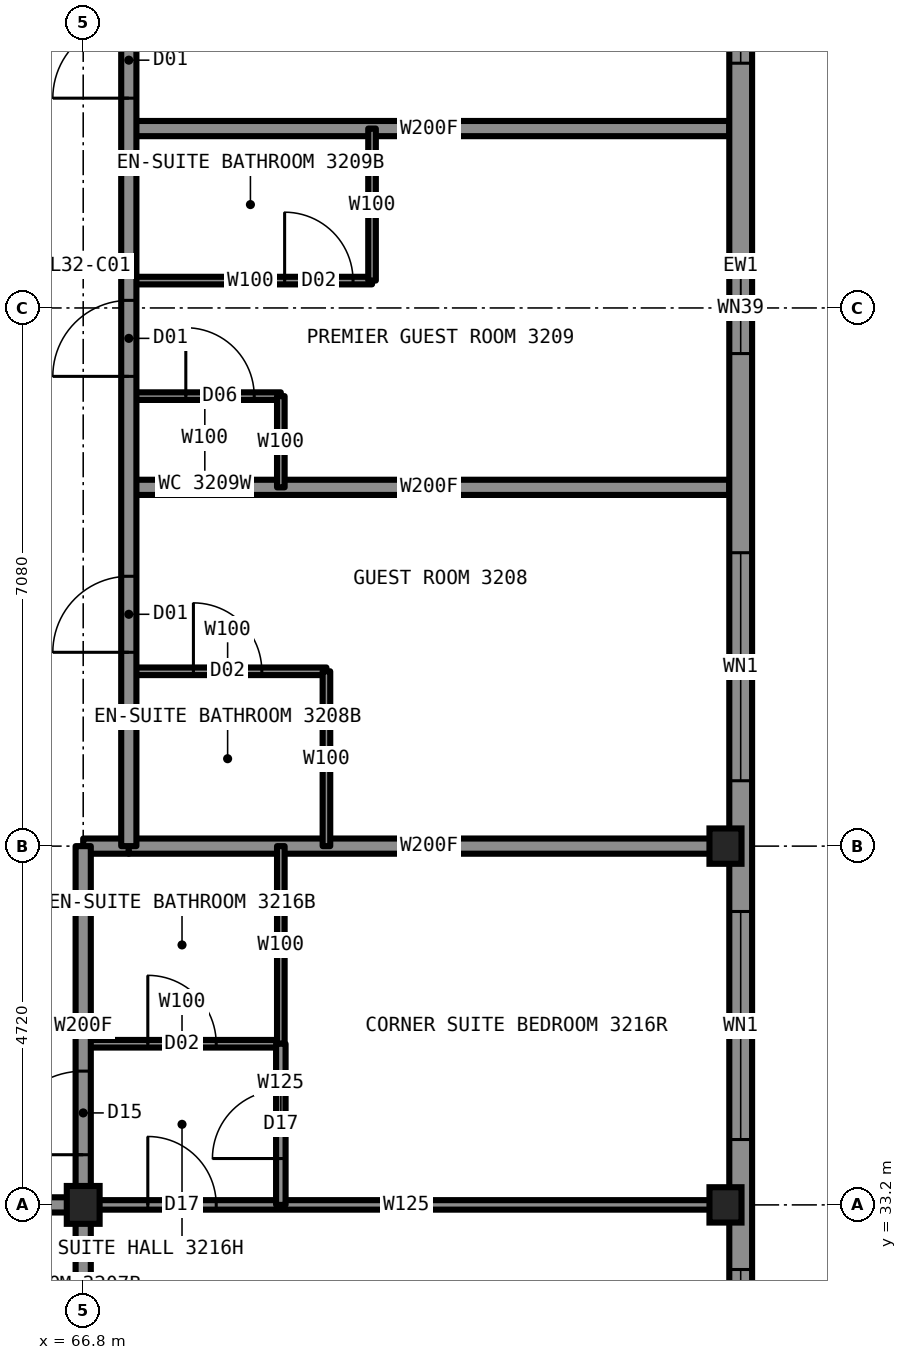
"""IFC4 building model, lengths in metres.
Left out: names, types, materials, properties, quantities, classifications, styles, units other than length and angle.
Written with IfcOpenShell. Run it as: python <this file> out.ifc"""

import sys

from ifc_helpers import new_model, si_unit, direction, frame, frame_2d, origin, origin_2d, place, context, subcontext, project, spatial, rectangle, i_section, extrude, element, fill, save


model = new_model("IFC4")
c1 = context("Model", 3, precision=1e-05, world=origin(), true_north=direction((0.0, 1.0)))
c2 = subcontext(c1, "Body", "Model", "MODEL_VIEW")
j1 = project(units=[si_unit("LENGTHUNIT", "METRE"), si_unit("PLANEANGLEUNIT", "RADIAN")], contexts=[c1])
p1 = place(None, origin())
s1 = spatial("IfcSite", under=j1, at=p1, CompositionType="ELEMENT")
p2 = place(p1, origin())
s2 = spatial("IfcBuilding", under=s1, at=p2, CompositionType="ELEMENT")
p3 = place(p2, frame((0.0, 0.0, 114.4)))
s3 = spatial("IfcBuildingStorey", under=s2, at=p3, CompositionType="ELEMENT", Elevation=114.4)
for number, where, z_axis, x_axis in (
    (1, (75.25, 33.2, 0.0), (0.0, 0.0, 1.0), (1.0, 0.0, 0.0)),
    (2, (75.25, 37.92, 0.0), (0.0, 0.0, 1.0), (1.0, 0.0, 0.0)),
):
    element("IfcColumn", number, at=place(p3, frame(where, z_axis=z_axis, x_axis=x_axis)), inside=s3, PredefinedType="COLUMN", context=c2, shape_type="SweptSolid", body=[
        extrude(i_section(OverallWidth=0.422, OverallDepth=0.465, WebThickness=0.045, FlangeThickness=0.073, at=origin_2d()), origin(), (0.0, 0.0, 1.0), 3.5),
    ])
p4 = place(p3, frame((66.8, 33.2, 0.0), z_axis=(0.0, 0.0, 1.0), x_axis=(1.0, 0.0, 0.0)))
e3 = element("IfcColumn", 3, at=p4, inside=s3, PredefinedType="COLUMN", context=c2, shape_type="SweptSolid", body=[
    extrude(i_section(OverallWidth=0.432, OverallDepth=0.498, WebThickness=0.056, FlangeThickness=0.089, at=origin_2d()), origin(), (0.0, 0.0, 1.0), 3.5),
])
p5 = place(p3, frame((67.4, 43.84, 0.0), z_axis=(0.0, 0.0, 1.0), x_axis=(1.0, 0.0, 0.0)))
e4 = element("IfcWall", 4, at=p5, inside=s3, PredefinedType="PARTITIONING", context=c2, shape_type="SweptSolid", body=[
    extrude(rectangle(XDim=2.0, YDim=0.1, at=frame_2d((1.0, 0.0))), origin(), (0.0, 0.0, 1.0), 3.33),
])
p6 = place(p5, frame((0.75, 0.0, 0.0)))
e5 = element("IfcOpeningElement", 5, at=p6, cuts=e4, PredefinedType="OPENING", context=c2, shape_type="SweptSolid", body=[
    extrude(rectangle(XDim=0.9, YDim=2.1, at=frame_2d((0.45, 1.05))), frame((0.0, 0.06, 0.0), z_axis=(0.0, -1.0, 0.0), x_axis=(1.0, 0.0, 0.0)), (0.0, 0.0, 1.0), 0.12),
])
p7 = place(p3, frame((43.2, 33.2, 0.0), z_axis=(0.0, 0.0, 1.0), x_axis=(1.0, 0.0, 0.0)))
e6 = element("IfcWall", 6, at=p7, inside=s3, PredefinedType="PARTITIONING", context=c2, shape_type="SweptSolid", body=[
    extrude(rectangle(XDim=23.6, YDim=0.2, at=frame_2d((11.8, 0.0))), origin(), (0.0, 0.0, 1.0), 3.33),
])
p8 = place(p7, frame((0.7, 0.0, 0.0)))
e7 = element("IfcOpeningElement", 7, at=p8, cuts=e6, PredefinedType="OPENING", context=c2, shape_type="SweptSolid", body=[
    extrude(rectangle(XDim=1.0, YDim=2.2, at=frame_2d((0.5, 1.1))), frame((0.0, 0.11, 0.0), z_axis=(0.0, -1.0, 0.0), x_axis=(1.0, 0.0, 0.0)), (0.0, 0.0, 1.0), 0.22),
])
p9 = place(p7, frame((6.57, 0.0, 0.0)))
e8 = element("IfcOpeningElement", 8, at=p9, cuts=e6, PredefinedType="OPENING", context=c2, shape_type="SweptSolid", body=[
    extrude(rectangle(XDim=1.1, YDim=2.2, at=frame_2d((0.55, 1.1))), frame((0.0, 0.11, 0.0), z_axis=(0.0, -1.0, 0.0), x_axis=(1.0, 0.0, 0.0)), (0.0, 0.0, 1.0), 0.22),
])
p10 = place(p7, frame((20.34, 0.0, 0.0)))
e9 = element("IfcOpeningElement", 9, at=p10, cuts=e6, PredefinedType="OPENING", context=c2, shape_type="SweptSolid", body=[
    extrude(rectangle(XDim=1.0, YDim=2.2, at=frame_2d((0.5, 1.1))), frame((0.0, 0.11, 0.0), z_axis=(0.0, -1.0, 0.0), x_axis=(1.0, 0.0, 0.0)), (0.0, 0.0, 1.0), 0.22),
])
p11 = place(p3, frame((66.8, 33.2, 0.0), z_axis=(0.0, 0.0, 1.0), x_axis=(1.0, 0.0, 0.0)))
e10 = element("IfcWall", 10, at=p11, inside=s3, PredefinedType="PARTITIONING", context=c2, shape_type="SweptSolid", body=[
    extrude(rectangle(XDim=8.5, YDim=0.125, at=frame_2d((4.25, 0.0))), origin(), (0.0, 0.0, 1.0), 2.573),
])
p12 = place(p11, frame((0.85, 0.0, 0.0)))
e11 = element("IfcOpeningElement", 11, at=p12, cuts=e10, PredefinedType="OPENING", context=c2, shape_type="SweptSolid", body=[
    extrude(rectangle(XDim=0.9, YDim=2.2, at=frame_2d((0.45, 1.1))), frame((0.0, 0.073, 0.0), z_axis=(0.0, -1.0, 0.0), x_axis=(1.0, 0.0, 0.0)), (0.0, 0.0, 1.0), 0.145),
])
p13 = place(p3, frame((67.4, 42.64, 0.0), z_axis=(0.0, 0.0, 1.0), x_axis=(1.0, 0.0, 0.0)))
e12 = element("IfcWall", 12, at=p13, inside=s3, PredefinedType="PARTITIONING", context=c2, shape_type="SweptSolid", body=[
    extrude(rectangle(XDim=7.9, YDim=0.2, at=frame_2d((3.95, 0.0))), origin(), (0.0, 0.0, 1.0), 2.731),
])
p14 = place(p3, frame((67.4, 40.22, 0.0), z_axis=(0.0, 0.0, 1.0), x_axis=(1.0, 0.0, 0.0)))
e13 = element("IfcWall", 13, at=p14, inside=s3, PredefinedType="PARTITIONING", context=c2, shape_type="SweptSolid", body=[
    extrude(rectangle(XDim=2.6, YDim=0.1, at=frame_2d((1.3, 0.0))), origin(), (0.0, 0.0, 1.0), 2.731),
])
p15 = place(p14, frame((0.85, 0.0, 0.0)))
e14 = element("IfcOpeningElement", 14, at=p15, cuts=e13, PredefinedType="OPENING", context=c2, shape_type="SweptSolid", body=[
    extrude(rectangle(XDim=0.9, YDim=2.1, at=frame_2d((0.45, 1.05))), frame((0.0, 0.06, 0.0), z_axis=(0.0, -1.0, 0.0), x_axis=(1.0, 0.0, 0.0)), (0.0, 0.0, 1.0), 0.12),
])
p16 = place(p3, frame((66.8, 37.92, 0.0), z_axis=(0.0, 0.0, 1.0), x_axis=(1.0, 0.0, 0.0)))
e15 = element("IfcWall", 15, at=p16, inside=s3, PredefinedType="PARTITIONING", context=c2, shape_type="SweptSolid", body=[
    extrude(rectangle(XDim=0.6, YDim=0.2, at=frame_2d((0.3, 0.0))), origin(), (0.0, 0.0, 1.0), 2.573),
])
p17 = place(p3, frame((67.4, 37.92, 0.0), z_axis=(0.0, 0.0, 1.0), x_axis=(1.0, 0.0, 0.0)))
e16 = element("IfcWall", 16, at=p17, inside=s3, PredefinedType="PARTITIONING", context=c2, shape_type="SweptSolid", body=[
    extrude(rectangle(XDim=7.9, YDim=0.2, at=frame_2d((3.95, 0.0))), origin(), (0.0, 0.0, 1.0), 2.573),
])
p18 = place(p3, frame((66.8, 35.32, 0.0), z_axis=(0.0, 0.0, 1.0), x_axis=(1.0, 0.0, 0.0)))
e17 = element("IfcWall", 17, at=p18, inside=s3, PredefinedType="PARTITIONING", context=c2, shape_type="SweptSolid", body=[
    extrude(rectangle(XDim=2.6, YDim=0.1, at=frame_2d((1.3, 0.0))), origin(), (0.0, 0.0, 1.0), 3.33),
])
p19 = place(p18, frame((0.85, 0.0, 0.0)))
e18 = element("IfcOpeningElement", 18, at=p19, cuts=e17, PredefinedType="OPENING", context=c2, shape_type="SweptSolid", body=[
    extrude(rectangle(XDim=0.9, YDim=2.1, at=frame_2d((0.45, 1.05))), frame((0.0, 0.06, 0.0), z_axis=(0.0, -1.0, 0.0), x_axis=(1.0, 0.0, 0.0)), (0.0, 0.0, 1.0), 0.12),
])
p20 = place(p3, frame((67.4, 45.36, 0.0), z_axis=(0.0, 0.0, 1.0), x_axis=(1.0, 0.0, 0.0)))
e19 = element("IfcWall", 19, at=p20, inside=s3, PredefinedType="PARTITIONING", context=c2, shape_type="SweptSolid", body=[
    extrude(rectangle(XDim=3.2, YDim=0.1, at=frame_2d((1.6, 0.0))), origin(), (0.0, 0.0, 1.0), 3.33),
])
p21 = place(p20, frame((2.05, 0.0, 0.0)))
e20 = element("IfcOpeningElement", 20, at=p21, cuts=e19, PredefinedType="OPENING", context=c2, shape_type="SweptSolid", body=[
    extrude(rectangle(XDim=0.9, YDim=2.1, at=frame_2d((0.45, 1.05))), frame((0.0, 0.06, 0.0), z_axis=(0.0, -1.0, 0.0), x_axis=(1.0, 0.0, 0.0)), (0.0, 0.0, 1.0), 0.12),
])
p22 = place(p3, frame((67.4, 47.36, 0.0), z_axis=(0.0, 0.0, 1.0), x_axis=(1.0, 0.0, 0.0)))
e21 = element("IfcWall", 21, at=p22, inside=s3, PredefinedType="PARTITIONING", context=c2, shape_type="SweptSolid", body=[
    extrude(rectangle(XDim=7.9, YDim=0.2, at=frame_2d((3.95, 0.0))), origin(), (0.0, 0.0, 1.0), 2.731),
])
p23 = place(p3, frame((66.8, 33.2, 0.0), z_axis=(0.0, 0.0, 1.0), x_axis=(0.0, 1.0, 0.0)))
e22 = element("IfcWall", 22, at=p23, inside=s3, PredefinedType="PARTITIONING", context=c2, shape_type="SweptSolid", body=[
    extrude(rectangle(XDim=4.72, YDim=0.2, at=frame_2d((2.36, 0.0))), origin(), (0.0, 0.0, 1.0), 3.33),
])
p24 = place(p23, frame((0.66, 0.0, 0.0)))
e23 = element("IfcOpeningElement", 23, at=p24, cuts=e22, PredefinedType="OPENING", context=c2, shape_type="SweptSolid", body=[
    extrude(rectangle(XDim=1.1, YDim=2.2, at=frame_2d((0.55, 1.1))), frame((0.0, 0.11, 0.0), z_axis=(0.0, -1.0, 0.0), x_axis=(1.0, 0.0, 0.0)), (0.0, 0.0, 1.0), 0.22),
])
p25 = place(p3, frame((66.8, 24.7, 0.0), z_axis=(0.0, 0.0, 1.0), x_axis=(0.0, 1.0, 0.0)))
e24 = element("IfcWall", 24, at=p25, inside=s3, PredefinedType="PARTITIONING", context=c2, shape_type="SweptSolid", body=[
    extrude(rectangle(XDim=8.5, YDim=0.2, at=frame_2d((4.25, 0.0))), origin(), (0.0, 0.0, 1.0), 2.573),
])
p26 = place(p3, frame((67.4, 37.92, 0.0), z_axis=(0.0, 0.0, 1.0), x_axis=(0.0, 1.0, 0.0)))
e25 = element("IfcWall", 25, at=p26, inside=s3, PredefinedType="PARTITIONING", context=c2, shape_type="SweptSolid", body=[
    extrude(rectangle(XDim=14.16, YDim=0.2, at=frame_2d((7.08, 0.0))), origin(), (0.0, 0.0, 1.0), 3.33),
])
p27 = place(p26, frame((2.55, 0.0, 0.0)))
e26 = element("IfcOpeningElement", 26, at=p27, cuts=e25, PredefinedType="OPENING", context=c2, shape_type="SweptSolid", body=[
    extrude(rectangle(XDim=1.0, YDim=2.2, at=frame_2d((0.5, 1.1))), frame((0.0, 0.11, 0.0), z_axis=(0.0, -1.0, 0.0), x_axis=(1.0, 0.0, 0.0)), (0.0, 0.0, 1.0), 0.22),
])
p28 = place(p26, frame((6.18, 0.0, 0.0)))
e27 = element("IfcOpeningElement", 27, at=p28, cuts=e25, PredefinedType="OPENING", context=c2, shape_type="SweptSolid", body=[
    extrude(rectangle(XDim=1.0, YDim=2.2, at=frame_2d((0.5, 1.1))), frame((0.0, 0.11, 0.0), z_axis=(0.0, -1.0, 0.0), x_axis=(1.0, 0.0, 0.0)), (0.0, 0.0, 1.0), 0.22),
])
p29 = place(p26, frame((9.84, 0.0, 0.0)))
e28 = element("IfcOpeningElement", 28, at=p29, cuts=e25, PredefinedType="OPENING", context=c2, shape_type="SweptSolid", body=[
    extrude(rectangle(XDim=1.0, YDim=2.2, at=frame_2d((0.5, 1.1))), frame((0.0, 0.11, 0.0), z_axis=(0.0, -1.0, 0.0), x_axis=(1.0, 0.0, 0.0)), (0.0, 0.0, 1.0), 0.22),
])
p30 = place(p3, frame((69.4, 35.32, 0.0), z_axis=(0.0, 0.0, 1.0), x_axis=(0.0, 1.0, 0.0)))
e29 = element("IfcWall", 29, at=p30, inside=s3, PredefinedType="PARTITIONING", context=c2, shape_type="SweptSolid", body=[
    extrude(rectangle(XDim=2.6, YDim=0.1, at=frame_2d((1.3, 0.0))), origin(), (0.0, 0.0, 1.0), 3.33),
])
p31 = place(p3, frame((69.4, 42.64, 0.0), z_axis=(0.0, 0.0, 1.0), x_axis=(0.0, 1.0, 0.0)))
e30 = element("IfcWall", 30, at=p31, inside=s3, PredefinedType="PARTITIONING", context=c2, shape_type="SweptSolid", body=[
    extrude(rectangle(XDim=1.2, YDim=0.1, at=frame_2d((0.6, 0.0))), origin(), (0.0, 0.0, 1.0), 3.33),
])
p32 = place(p3, frame((69.4, 33.2, 0.0), z_axis=(0.0, 0.0, 1.0), x_axis=(0.0, 1.0, 0.0)))
e31 = element("IfcWall", 31, at=p32, inside=s3, PredefinedType="PARTITIONING", context=c2, shape_type="SweptSolid", body=[
    extrude(rectangle(XDim=2.12, YDim=0.125, at=frame_2d((1.06, 0.0))), origin(), (0.0, 0.0, 1.0), 3.33),
])
p33 = place(p32, frame((0.61, 0.0, 0.0)))
e32 = element("IfcOpeningElement", 32, at=p33, cuts=e31, PredefinedType="OPENING", context=c2, shape_type="SweptSolid", body=[
    extrude(rectangle(XDim=0.9, YDim=2.2, at=frame_2d((0.45, 1.1))), frame((0.0, 0.073, 0.0), z_axis=(0.0, -1.0, 0.0), x_axis=(1.0, 0.0, 0.0)), (0.0, 0.0, 1.0), 0.145),
])
p34 = place(p3, frame((70.0, 37.92, 0.0), z_axis=(0.0, 0.0, 1.0), x_axis=(0.0, 1.0, 0.0)))
e33 = element("IfcWall", 33, at=p34, inside=s3, PredefinedType="PARTITIONING", context=c2, shape_type="SweptSolid", body=[
    extrude(rectangle(XDim=2.3, YDim=0.1, at=frame_2d((1.15, 0.0))), origin(), (0.0, 0.0, 1.0), 3.33),
])
p35 = place(p3, frame((70.6, 45.36, 0.0), z_axis=(0.0, 0.0, 1.0), x_axis=(0.0, 1.0, 0.0)))
e34 = element("IfcWall", 34, at=p35, inside=s3, PredefinedType="PARTITIONING", context=c2, shape_type="SweptSolid", body=[
    extrude(rectangle(XDim=2.0, YDim=0.1, at=frame_2d((1.0, 0.0))), origin(), (0.0, 0.0, 1.0), 3.33),
])
p36 = place(p3, frame((75.45, 29.9, 0.0), z_axis=(0.0, 0.0, 1.0), x_axis=(0.0, 1.0, 0.0)))
e35 = element("IfcWall", 35, at=p36, inside=s3, PredefinedType="SOLIDWALL", context=c2, shape_type="SweptSolid", body=[
    extrude(rectangle(XDim=30.2, YDim=0.3, at=frame_2d((15.1, 0.0))), origin(), (0.0, 0.0, 1.0), 2.83),
])
p37 = place(p36, frame((0.85, 0.0, 0.5)))
e36 = element("IfcOpeningElement", 36, at=p37, cuts=e35, PredefinedType="OPENING", context=c2, shape_type="SweptSolid", body=[
    extrude(rectangle(XDim=1.6, YDim=2.0, at=frame_2d((0.8, 1.0))), frame((0.0, 0.16, 0.0), z_axis=(0.0, -1.0, 0.0), x_axis=(1.0, 0.0, 0.0)), (0.0, 0.0, 1.0), 0.32),
])
p38 = place(p36, frame((4.16, 0.0, 0.5)))
e37 = element("IfcOpeningElement", 37, at=p38, cuts=e35, PredefinedType="OPENING", context=c2, shape_type="SweptSolid", body=[
    extrude(rectangle(XDim=3.0, YDim=2.0, at=frame_2d((1.5, 1.0))), frame((0.0, 0.16, 0.0), z_axis=(0.0, -1.0, 0.0), x_axis=(1.0, 0.0, 0.0)), (0.0, 0.0, 1.0), 0.32),
])
p39 = place(p36, frame((10.53, 0.0, 0.5)))
e38 = element("IfcOpeningElement", 38, at=p39, cuts=e35, PredefinedType="OPENING", context=c2, shape_type="SweptSolid", body=[
    extrude(rectangle(XDim=1.3, YDim=1.9, at=frame_2d((0.65, 0.95))), frame((0.0, 0.16, 0.0), z_axis=(0.0, -1.0, 0.0), x_axis=(1.0, 0.0, 0.0)), (0.0, 0.0, 1.0), 0.32),
])
p40 = place(p36, frame((13.6, 0.0, 0.5)))
e39 = element("IfcOpeningElement", 39, at=p40, cuts=e35, PredefinedType="OPENING", context=c2, shape_type="SweptSolid", body=[
    extrude(rectangle(XDim=3.0, YDim=2.0, at=frame_2d((1.5, 1.0))), frame((0.0, 0.16, 0.0), z_axis=(0.0, -1.0, 0.0), x_axis=(1.0, 0.0, 0.0)), (0.0, 0.0, 1.0), 0.32),
])
p41 = place(p36, frame((18.32, 0.0, 0.5)))
e40 = element("IfcOpeningElement", 40, at=p41, cuts=e35, PredefinedType="OPENING", context=c2, shape_type="SweptSolid", body=[
    extrude(rectangle(XDim=1.3, YDim=1.9, at=frame_2d((0.65, 0.95))), frame((0.0, 0.16, 0.0), z_axis=(0.0, -1.0, 0.0), x_axis=(1.0, 0.0, 0.0)), (0.0, 0.0, 1.0), 0.32),
])
p42 = place(p36, frame((23.04, 0.0, 0.5)))
e41 = element("IfcOpeningElement", 41, at=p42, cuts=e35, PredefinedType="OPENING", context=c2, shape_type="SweptSolid", body=[
    extrude(rectangle(XDim=3.0, YDim=2.0, at=frame_2d((1.5, 1.0))), frame((0.0, 0.16, 0.0), z_axis=(0.0, -1.0, 0.0), x_axis=(1.0, 0.0, 0.0)), (0.0, 0.0, 1.0), 0.32),
])
p43 = place(p36, frame((27.75, 0.0, 0.5)))
e42 = element("IfcOpeningElement", 42, at=p43, cuts=e35, PredefinedType="OPENING", context=c2, shape_type="SweptSolid", body=[
    extrude(rectangle(XDim=1.6, YDim=2.0, at=frame_2d((0.8, 1.0))), frame((0.0, 0.16, 0.0), z_axis=(0.0, -1.0, 0.0), x_axis=(1.0, 0.0, 0.0)), (0.0, 0.0, 1.0), 0.32),
])
p44 = place(p36, frame((9.88, 0.0, 0.5)))
e43 = element("IfcOpeningElement", 43, at=p44, cuts=e35, PredefinedType="OPENING", context=c2, shape_type="SweptSolid", body=[
    extrude(rectangle(XDim=0.6, YDim=0.9, at=frame_2d((0.3, 0.45))), frame((0.0, 0.16, 0.0), z_axis=(0.0, -1.0, 0.0), x_axis=(1.0, 0.0, 0.0)), (0.0, 0.0, 1.0), 0.32),
])
p45 = place(p36, frame((19.67, 0.0, 0.5)))
e44 = element("IfcOpeningElement", 44, at=p45, cuts=e35, PredefinedType="OPENING", context=c2, shape_type="SweptSolid", body=[
    extrude(rectangle(XDim=0.6, YDim=0.9, at=frame_2d((0.3, 0.45))), frame((0.0, 0.16, 0.0), z_axis=(0.0, -1.0, 0.0), x_axis=(1.0, 0.0, 0.0)), (0.0, 0.0, 1.0), 0.32),
])
p46 = place(p27, origin())
e45 = element("IfcDoor", 45, at=p46, inside=s3, OperationType="SINGLE_SWING_LEFT", PredefinedType="DOOR", context=c2, shape_type="SweptSolid", body=[
    extrude(rectangle(XDim=1.0, YDim=2.2, at=frame_2d((0.5, 1.1))), frame((0.0, 0.025, 0.0), z_axis=(0.0, -1.0, 0.0), x_axis=(1.0, 0.0, 0.0)), (0.0, 0.0, 1.0), 0.05),
])
fill(e26, e45)
p47 = place(p15, origin())
e46 = element("IfcDoor", 46, at=p47, inside=s3, OperationType="SINGLE_SWING_RIGHT", PredefinedType="DOOR", context=c2, shape_type="SweptSolid", body=[
    extrude(rectangle(XDim=0.9, YDim=2.1, at=frame_2d((0.45, 1.05))), frame((0.0, 0.025, 0.0), z_axis=(0.0, -1.0, 0.0), x_axis=(1.0, 0.0, 0.0)), (0.0, 0.0, 1.0), 0.05),
])
fill(e14, e46)
p48 = place(p28, origin())
e47 = element("IfcDoor", 47, at=p48, inside=s3, OperationType="SINGLE_SWING_LEFT", PredefinedType="DOOR", context=c2, shape_type="SweptSolid", body=[
    extrude(rectangle(XDim=1.0, YDim=2.2, at=frame_2d((0.5, 1.1))), frame((0.0, 0.025, 0.0), z_axis=(0.0, -1.0, 0.0), x_axis=(1.0, 0.0, 0.0)), (0.0, 0.0, 1.0), 0.05),
])
fill(e27, e47)
p49 = place(p21, origin())
e48 = element("IfcDoor", 48, at=p49, inside=s3, OperationType="SINGLE_SWING_RIGHT", PredefinedType="DOOR", context=c2, shape_type="SweptSolid", body=[
    extrude(rectangle(XDim=0.9, YDim=2.1, at=frame_2d((0.45, 1.05))), frame((0.0, 0.025, 0.0), z_axis=(0.0, -1.0, 0.0), x_axis=(1.0, 0.0, 0.0)), (0.0, 0.0, 1.0), 0.05),
])
fill(e20, e48)
p50 = place(p6, origin())
e49 = element("IfcDoor", 49, at=p50, inside=s3, OperationType="SINGLE_SWING_LEFT", PredefinedType="DOOR", context=c2, shape_type="SweptSolid", body=[
    extrude(rectangle(XDim=0.9, YDim=2.1, at=frame_2d((0.45, 1.05))), frame((0.0, 0.025, 0.0), z_axis=(0.0, -1.0, 0.0), x_axis=(1.0, 0.0, 0.0)), (0.0, 0.0, 1.0), 0.05),
])
fill(e5, e49)
p51 = place(p29, origin())
e50 = element("IfcDoor", 50, at=p51, inside=s3, OperationType="SINGLE_SWING_LEFT", PredefinedType="DOOR", context=c2, shape_type="SweptSolid", body=[
    extrude(rectangle(XDim=1.0, YDim=2.2, at=frame_2d((0.5, 1.1))), frame((0.0, 0.025, 0.0), z_axis=(0.0, -1.0, 0.0), x_axis=(1.0, 0.0, 0.0)), (0.0, 0.0, 1.0), 0.05),
])
fill(e28, e50)
p52 = place(p12, origin())
e51 = element("IfcDoor", 51, at=p52, inside=s3, OperationType="SINGLE_SWING_LEFT", PredefinedType="DOOR", context=c2, shape_type="SweptSolid", body=[
    extrude(rectangle(XDim=0.9, YDim=2.2, at=frame_2d((0.45, 1.1))), frame((0.0, 0.025, 0.0), z_axis=(0.0, -1.0, 0.0), x_axis=(1.0, 0.0, 0.0)), (0.0, 0.0, 1.0), 0.05),
])
fill(e11, e51)
p53 = place(p19, origin())
e52 = element("IfcDoor", 52, at=p53, inside=s3, OperationType="SINGLE_SWING_RIGHT", PredefinedType="DOOR", context=c2, shape_type="SweptSolid", body=[
    extrude(rectangle(XDim=0.9, YDim=2.1, at=frame_2d((0.45, 1.05))), frame((0.0, 0.025, 0.0), z_axis=(0.0, -1.0, 0.0), x_axis=(1.0, 0.0, 0.0)), (0.0, 0.0, 1.0), 0.05),
])
fill(e18, e52)
p54 = place(p24, origin())
e53 = element("IfcDoor", 53, at=p54, inside=s3, OperationType="SINGLE_SWING_LEFT", PredefinedType="DOOR", context=c2, shape_type="SweptSolid", body=[
    extrude(rectangle(XDim=1.1, YDim=2.2, at=frame_2d((0.55, 1.1))), frame((0.0, 0.025, 0.0), z_axis=(0.0, -1.0, 0.0), x_axis=(1.0, 0.0, 0.0)), (0.0, 0.0, 1.0), 0.05),
])
fill(e23, e53)
p55 = place(p33, origin())
e54 = element("IfcDoor", 54, at=p55, inside=s3, OperationType="SINGLE_SWING_LEFT", PredefinedType="DOOR", context=c2, shape_type="SweptSolid", body=[
    extrude(rectangle(XDim=0.9, YDim=2.2, at=frame_2d((0.45, 1.1))), frame((0.0, 0.025, 0.0), z_axis=(0.0, -1.0, 0.0), x_axis=(1.0, 0.0, 0.0)), (0.0, 0.0, 1.0), 0.05),
])
fill(e32, e54)
p56 = place(p37, origin())
e55 = element("IfcWindow", 55, at=p56, inside=s3, PartitioningType="SINGLE_PANEL", PredefinedType="WINDOW", context=c2, shape_type="SweptSolid", body=[
    extrude(rectangle(XDim=1.6, YDim=2.0, at=frame_2d((0.8, 1.0))), frame((0.0, 0.03, 0.0), z_axis=(0.0, -1.0, 0.0), x_axis=(1.0, 0.0, 0.0)), (0.0, 0.0, 1.0), 0.06),
])
fill(e36, e55)
p57 = place(p38, origin())
e56 = element("IfcWindow", 56, at=p57, inside=s3, PartitioningType="SINGLE_PANEL", PredefinedType="WINDOW", context=c2, shape_type="SweptSolid", body=[
    extrude(rectangle(XDim=3.0, YDim=2.0, at=frame_2d((1.5, 1.0))), frame((0.0, 0.03, 0.0), z_axis=(0.0, -1.0, 0.0), x_axis=(1.0, 0.0, 0.0)), (0.0, 0.0, 1.0), 0.06),
])
fill(e37, e56)
p58 = place(p39, origin())
e57 = element("IfcWindow", 57, at=p58, inside=s3, PartitioningType="SINGLE_PANEL", PredefinedType="WINDOW", context=c2, shape_type="SweptSolid", body=[
    extrude(rectangle(XDim=1.3, YDim=1.9, at=frame_2d((0.65, 0.95))), frame((0.0, 0.03, 0.0), z_axis=(0.0, -1.0, 0.0), x_axis=(1.0, 0.0, 0.0)), (0.0, 0.0, 1.0), 0.06),
])
fill(e38, e57)
p59 = place(p40, origin())
e58 = element("IfcWindow", 58, at=p59, inside=s3, PartitioningType="SINGLE_PANEL", PredefinedType="WINDOW", context=c2, shape_type="SweptSolid", body=[
    extrude(rectangle(XDim=3.0, YDim=2.0, at=frame_2d((1.5, 1.0))), frame((0.0, 0.03, 0.0), z_axis=(0.0, -1.0, 0.0), x_axis=(1.0, 0.0, 0.0)), (0.0, 0.0, 1.0), 0.06),
])
fill(e39, e58)
p60 = place(p41, origin())
e59 = element("IfcWindow", 59, at=p60, inside=s3, PartitioningType="SINGLE_PANEL", PredefinedType="WINDOW", context=c2, shape_type="SweptSolid", body=[
    extrude(rectangle(XDim=1.3, YDim=1.9, at=frame_2d((0.65, 0.95))), frame((0.0, 0.03, 0.0), z_axis=(0.0, -1.0, 0.0), x_axis=(1.0, 0.0, 0.0)), (0.0, 0.0, 1.0), 0.06),
])
fill(e40, e59)
p61 = place(p44, origin())
e60 = element("IfcWindow", 60, at=p61, inside=s3, PartitioningType="SINGLE_PANEL", PredefinedType="WINDOW", context=c2, shape_type="SweptSolid", body=[
    extrude(rectangle(XDim=0.6, YDim=0.9, at=frame_2d((0.3, 0.45))), frame((0.0, 0.03, 0.0), z_axis=(0.0, -1.0, 0.0), x_axis=(1.0, 0.0, 0.0)), (0.0, 0.0, 1.0), 0.06),
])
fill(e43, e60)
save(model, sys.argv[1])
